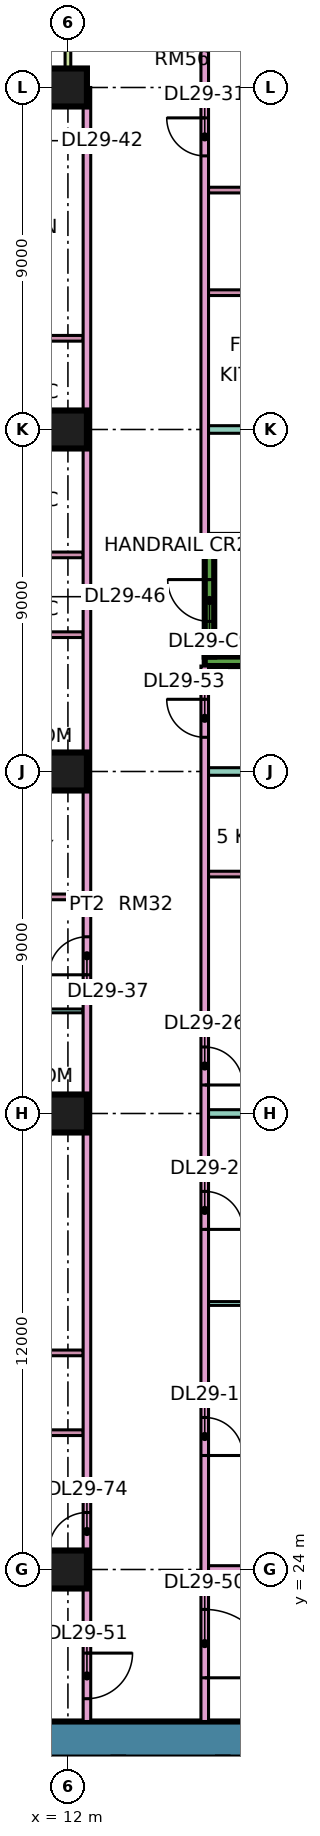
"""IFC4 building model, lengths in metres.
Left out: names, types, materials, properties, quantities, classifications, styles, units other than length and angle.
Written with IfcOpenShell. Run it as: python <this file> out.ifc"""

import sys

from ifc_helpers import new_model, si_unit, direction, frame, frame_2d, origin, origin_2d, place, context, subcontext, project, spatial, rectangle, extrude, element, fill, save


model = new_model("IFC4")
c1 = context("Model", 3, precision=1e-05, world=origin(), true_north=direction((0.0, 1.0)))
c2 = subcontext(c1, "Body", "Model", "MODEL_VIEW")
j1 = project(units=[si_unit("LENGTHUNIT", "METRE"), si_unit("PLANEANGLEUNIT", "RADIAN")], contexts=[c1])
p1 = place(None, origin())
s1 = spatial("IfcSite", under=j1, at=p1, CompositionType="ELEMENT")
p2 = place(p1, origin())
s2 = spatial("IfcBuilding", under=s1, at=p2, CompositionType="ELEMENT")
p3 = place(p2, frame((0.0, 0.0, 125.65)))
s3 = spatial("IfcBuildingStorey", under=s2, at=p3, CompositionType="ELEMENT", Elevation=125.65)
for number, where, z_axis, x_axis in (
    (1, (12.0, 24.0, 0.0), (0.0, 0.0, 1.0), (1.0, 0.0, 0.0)),
    (2, (12.0, 36.0, 0.0), (0.0, 0.0, 1.0), (1.0, 0.0, 0.0)),
    (3, (12.0, 45.0, 0.0), (0.0, 0.0, 1.0), (1.0, 0.0, 0.0)),
    (4, (12.0, 54.0, 0.0), (0.0, 0.0, 1.0), (1.0, 0.0, 0.0)),
    (5, (12.0, 63.0, 0.0), (0.0, 0.0, 1.0), (1.0, 0.0, 0.0)),
):
    element("IfcColumn", number, at=place(p3, frame(where, z_axis=z_axis, x_axis=x_axis)), inside=s3, PredefinedType="COLUMN", context=c2, shape_type="SweptSolid", body=[
        extrude(rectangle(XDim=1.0, YDim=1.0, at=origin_2d()), origin(), (0.0, 0.0, 1.0), 3.75),
    ])
p4 = place(p3, frame((9.0, 19.525, 0.0), z_axis=(0.0, 0.0, 1.0), x_axis=(1.0, 0.0, 0.0)))
e6 = element("IfcWall", 6, at=p4, inside=s3, PredefinedType="SHEAR", context=c2, shape_type="SweptSolid", body=[
    extrude(rectangle(XDim=25.0, YDim=0.95, at=frame_2d((12.5, 0.0))), origin(), (0.0, 0.0, 1.0), 3.75),
])
p5 = place(p4, frame((19.1, 0.0, 0.0)))
e7 = element("IfcOpeningElement", 7, at=p5, cuts=e6, PredefinedType="OPENING", context=c2, shape_type="SweptSolid", body=[
    extrude(rectangle(XDim=1.8, YDim=2.4, at=frame_2d((0.9, 1.2))), frame((0.0, 0.485, 0.0), z_axis=(0.0, -1.0, 0.0), x_axis=(1.0, 0.0, 0.0)), (0.0, 0.0, 1.0), 0.97),
])
for number, where, z_axis, x_axis in (
    (8, (15.6, 47.9, 0.0), (0.0, 0.0, 1.0), (1.0, 0.0, 0.0)),
    (9, (15.6, 51.1, 0.0), (0.0, 0.0, 1.0), (1.0, 0.0, 0.0)),
):
    element("IfcWall", number, at=place(p3, frame(where, z_axis=z_axis, x_axis=x_axis)), inside=s3, PredefinedType="SHEAR", context=c2, shape_type="SweptSolid", body=[
        extrude(rectangle(XDim=7.0, YDim=0.25, at=frame_2d((3.5, 0.0))), origin(), (0.0, 0.0, 1.0), 3.75),
    ])
p6 = place(p3, frame((15.725, 48.025, 0.0), z_axis=(0.0, 0.0, 1.0), x_axis=(0.0, 1.0, 0.0)))
e10 = element("IfcWall", 10, at=p6, inside=s3, PredefinedType="SHEAR", context=c2, shape_type="SweptSolid", body=[
    extrude(rectangle(XDim=2.95, YDim=0.25, at=frame_2d((1.475, 0.0))), origin(), (0.0, 0.0, 1.0), 3.75),
])
p7 = place(p6, frame((0.925, 0.0, 0.0)))
e11 = element("IfcOpeningElement", 11, at=p7, cuts=e10, PredefinedType="OPENING", context=c2, shape_type="SweptSolid", body=[
    extrude(rectangle(XDim=1.1, YDim=2.2, at=frame_2d((0.55, 1.1))), frame((0.0, 0.135, 0.0), z_axis=(0.0, -1.0, 0.0), x_axis=(1.0, 0.0, 0.0)), (0.0, 0.0, 1.0), 0.27),
])
p8 = place(p3, frame((11.925, 63.0, 0.0), z_axis=(0.0, 0.0, 1.0), x_axis=(-1.0, 0.0, 0.0)))
e12 = element("IfcWall", 12, at=p8, inside=s3, PredefinedType="SOLIDWALL", context=c2, shape_type="SweptSolid", body=[
    extrude(rectangle(XDim=10.35, YDim=0.15, at=frame_2d((5.175, 0.0))), origin(), (0.0, 0.0, 1.0), 3.35),
])
p9 = place(p8, frame((0.875, 0.0, 0.45)))
e13 = element("IfcOpeningElement", 13, at=p9, cuts=e12, PredefinedType="OPENING", context=c2, shape_type="SweptSolid", body=[
    extrude(rectangle(XDim=2.4, YDim=2.4, at=frame_2d((1.2, 1.2))), frame((0.0, 0.085, 0.0), z_axis=(0.0, -1.0, 0.0), x_axis=(1.0, 0.0, 0.0)), (0.0, 0.0, 1.0), 0.17),
])
p10 = place(p8, frame((6.688, 0.0, 0.0)))
e14 = element("IfcOpeningElement", 14, at=p10, cuts=e12, PredefinedType="OPENING", context=c2, shape_type="SweptSolid", body=[
    extrude(rectangle(XDim=1.8, YDim=2.4, at=frame_2d((0.9, 1.2))), frame((0.0, 0.085, 0.0), z_axis=(0.0, -1.0, 0.0), x_axis=(1.0, 0.0, 0.0)), (0.0, 0.0, 1.0), 0.17),
])
p11 = place(p3, frame((12.0, 64.5, 0.0), z_axis=(0.0, 0.0, 1.0), x_axis=(0.0, -1.0, 0.0)))
e15 = element("IfcWall", 15, at=p11, inside=s3, PredefinedType="SOLIDWALL", context=c2, shape_type="SweptSolid", body=[
    extrude(rectangle(XDim=1.5, YDim=0.15, at=frame_2d((0.75, 0.0))), origin(), (0.0, 0.0, 1.0), 3.35),
])
p12 = place(p3, frame((-1.35, 22.4, 0.0), z_axis=(0.0, 0.0, 1.0), x_axis=(1.0, 0.0, 0.0)))
e16 = element("IfcWall", 16, at=p12, inside=s3, PredefinedType="PARTITIONING", context=c2, shape_type="SweptSolid", body=[
    extrude(rectangle(XDim=13.75, YDim=0.2, at=frame_2d((6.875, 0.0))), origin(), (0.0, 0.0, 1.0), 3.35),
])
p13 = place(p3, frame((0.0, 36.0, 0.0), z_axis=(0.0, 0.0, 1.0), x_axis=(1.0, 0.0, 0.0)))
e17 = element("IfcWall", 17, at=p13, inside=s3, PredefinedType="PARTITIONING", context=c2, shape_type="SweptSolid", body=[
    extrude(rectangle(XDim=12.4, YDim=0.2, at=frame_2d((6.2, 0.0))), origin(), (0.0, 0.0, 1.0), 3.35),
])
for number, where, z_axis, x_axis in (
    (18, (7.175, 27.6, 0.0), (0.0, 0.0, 1.0), (1.0, 0.0, 0.0)),
    (19, (7.175, 29.7, 0.0), (0.0, 0.0, 1.0), (1.0, 0.0, 0.0)),
):
    element("IfcWall", number, at=place(p3, frame(where, z_axis=z_axis, x_axis=x_axis)), inside=s3, PredefinedType="PARTITIONING", context=c2, shape_type="SweptSolid", body=[
        extrude(rectangle(XDim=5.225, YDim=0.15, at=frame_2d((2.612, 0.0))), origin(), (0.0, 0.0, 1.0), 3.35),
    ])
p14 = place(p3, frame((8.25, 38.7, 0.0), z_axis=(0.0, 0.0, 1.0), x_axis=(1.0, 0.0, 0.0)))
e20 = element("IfcWall", 20, at=p14, inside=s3, PredefinedType="PARTITIONING", context=c2, shape_type="SweptSolid", body=[
    extrude(rectangle(XDim=4.15, YDim=0.1, at=frame_2d((2.075, 0.0))), origin(), (0.0, 0.0, 1.0), 3.35),
])
p15 = place(p14, frame((1.7, 0.0, 0.0)))
e21 = element("IfcOpeningElement", 21, at=p15, cuts=e20, PredefinedType="OPENING", context=c2, shape_type="SweptSolid", body=[
    extrude(rectangle(XDim=0.9, YDim=2.1, at=frame_2d((0.45, 1.05))), frame((0.0, 0.06, 0.0), z_axis=(0.0, -1.0, 0.0), x_axis=(1.0, 0.0, 0.0)), (0.0, 0.0, 1.0), 0.12),
])
for number, where, z_axis, x_axis in (
    (22, (8.375, 41.7, 0.0), (0.0, 0.0, 1.0), (1.0, 0.0, 0.0)),
    (23, (8.375, 45.0, 0.0), (0.0, 0.0, 1.0), (1.0, 0.0, 0.0)),
    (24, (8.375, 48.6, 0.0), (0.0, 0.0, 1.0), (1.0, 0.0, 0.0)),
    (25, (8.375, 50.7, 0.0), (0.0, 0.0, 1.0), (1.0, 0.0, 0.0)),
    (26, (8.375, 54.3, 0.0), (0.0, 0.0, 1.0), (1.0, 0.0, 0.0)),
    (27, (8.375, 56.4, 0.0), (0.0, 0.0, 1.0), (1.0, 0.0, 0.0)),
):
    element("IfcWall", number, at=place(p3, frame(where, z_axis=z_axis, x_axis=x_axis)), inside=s3, PredefinedType="PARTITIONING", context=c2, shape_type="SweptSolid", body=[
        extrude(rectangle(XDim=4.025, YDim=0.15, at=frame_2d((2.012, 0.0))), origin(), (0.0, 0.0, 1.0), 3.35),
    ])
p16 = place(p3, frame((12.5, 20.0, 0.0), z_axis=(0.0, 0.0, 1.0), x_axis=(0.0, 1.0, 0.0)))
e28 = element("IfcWall", 28, at=p16, inside=s3, PredefinedType="PARTITIONING", context=c2, shape_type="SweptSolid", body=[
    extrude(rectangle(XDim=43.0, YDim=0.2, at=frame_2d((21.5, 0.0))), origin(), (0.0, 0.0, 1.0), 3.35),
])
p17 = place(p16, frame((19.65, 0.0, 0.0)))
e29 = element("IfcOpeningElement", 29, at=p17, cuts=e28, PredefinedType="OPENING", context=c2, shape_type="SweptSolid", body=[
    extrude(rectangle(XDim=1.0, YDim=2.1, at=frame_2d((0.5, 1.05))), frame((0.0, 0.11, 0.0), z_axis=(0.0, -1.0, 0.0), x_axis=(1.0, 0.0, 0.0)), (0.0, 0.0, 1.0), 0.22),
])
p18 = place(p16, frame((0.6, 0.0, 0.0)))
e30 = element("IfcOpeningElement", 30, at=p18, cuts=e28, PredefinedType="OPENING", context=c2, shape_type="SweptSolid", body=[
    extrude(rectangle(XDim=1.2, YDim=2.1, at=frame_2d((0.6, 1.05))), frame((0.0, 0.11, 0.0), z_axis=(0.0, -1.0, 0.0), x_axis=(1.0, 0.0, 0.0)), (0.0, 0.0, 1.0), 0.22),
])
p19 = place(p16, frame((4.5, 0.0, 0.0)))
e31 = element("IfcOpeningElement", 31, at=p19, cuts=e28, PredefinedType="OPENING", context=c2, shape_type="SweptSolid", body=[
    extrude(rectangle(XDim=1.0, YDim=2.1, at=frame_2d((0.5, 1.05))), frame((0.0, 0.11, 0.0), z_axis=(0.0, -1.0, 0.0), x_axis=(1.0, 0.0, 0.0)), (0.0, 0.0, 1.0), 0.22),
])
p20 = place(p3, frame((15.6, 20.0, 0.0), z_axis=(0.0, 0.0, 1.0), x_axis=(0.0, 1.0, 0.0)))
e32 = element("IfcWall", 32, at=p20, inside=s3, PredefinedType="PARTITIONING", context=c2, shape_type="SweptSolid", body=[
    extrude(rectangle(XDim=27.775, YDim=0.2, at=frame_2d((13.887, 0.0))), origin(), (0.0, 0.0, 1.0), 3.35),
])
p21 = place(p20, frame((7.0, 0.0, 0.0)))
e33 = element("IfcOpeningElement", 33, at=p21, cuts=e32, PredefinedType="OPENING", context=c2, shape_type="SweptSolid", body=[
    extrude(rectangle(XDim=1.0, YDim=2.1, at=frame_2d((0.5, 1.05))), frame((0.0, 0.11, 0.0), z_axis=(0.0, -1.0, 0.0), x_axis=(1.0, 0.0, 0.0)), (0.0, 0.0, 1.0), 0.22),
])
p22 = place(p20, frame((12.95, 0.0, 0.0)))
e34 = element("IfcOpeningElement", 34, at=p22, cuts=e32, PredefinedType="OPENING", context=c2, shape_type="SweptSolid", body=[
    extrude(rectangle(XDim=1.0, YDim=2.1, at=frame_2d((0.5, 1.05))), frame((0.0, 0.11, 0.0), z_axis=(0.0, -1.0, 0.0), x_axis=(1.0, 0.0, 0.0)), (0.0, 0.0, 1.0), 0.22),
])
p23 = place(p20, frame((16.75, 0.0, 0.0)))
e35 = element("IfcOpeningElement", 35, at=p23, cuts=e32, PredefinedType="OPENING", context=c2, shape_type="SweptSolid", body=[
    extrude(rectangle(XDim=1.0, YDim=2.1, at=frame_2d((0.5, 1.05))), frame((0.0, 0.11, 0.0), z_axis=(0.0, -1.0, 0.0), x_axis=(1.0, 0.0, 0.0)), (0.0, 0.0, 1.0), 0.22),
])
p24 = place(p20, frame((1.15, 0.0, 0.0)))
e36 = element("IfcOpeningElement", 36, at=p24, cuts=e32, PredefinedType="OPENING", context=c2, shape_type="SweptSolid", body=[
    extrude(rectangle(XDim=1.8, YDim=2.1, at=frame_2d((0.9, 1.05))), frame((0.0, 0.11, 0.0), z_axis=(0.0, -1.0, 0.0), x_axis=(1.0, 0.0, 0.0)), (0.0, 0.0, 1.0), 0.22),
])
p25 = place(p20, frame((25.9, 0.0, 0.0)))
e37 = element("IfcOpeningElement", 37, at=p25, cuts=e32, PredefinedType="OPENING", context=c2, shape_type="SweptSolid", body=[
    extrude(rectangle(XDim=1.0, YDim=2.1, at=frame_2d((0.5, 1.05))), frame((0.0, 0.11, 0.0), z_axis=(0.0, -1.0, 0.0), x_axis=(1.0, 0.0, 0.0)), (0.0, 0.0, 1.0), 0.22),
])
p26 = place(p3, frame((15.6, 51.225, 0.0), z_axis=(0.0, 0.0, 1.0), x_axis=(0.0, 1.0, 0.0)))
e38 = element("IfcWall", 38, at=p26, inside=s3, PredefinedType="PARTITIONING", context=c2, shape_type="SweptSolid", body=[
    extrude(rectangle(XDim=13.125, YDim=0.2, at=frame_2d((6.562, 0.0))), origin(), (0.0, 0.0, 1.0), 3.35),
])
p27 = place(p26, frame((9.975, 0.0, 0.0)))
e39 = element("IfcOpeningElement", 39, at=p27, cuts=e38, PredefinedType="OPENING", context=c2, shape_type="SweptSolid", body=[
    extrude(rectangle(XDim=1.0, YDim=2.1, at=frame_2d((0.5, 1.05))), frame((0.0, 0.11, 0.0), z_axis=(0.0, -1.0, 0.0), x_axis=(1.0, 0.0, 0.0)), (0.0, 0.0, 1.0), 0.22),
])
p28 = place(p3, frame((15.7, 24.0, 0.0), z_axis=(0.0, 0.0, 1.0), x_axis=(1.0, 0.0, 0.0)))
e40 = element("IfcWall", 40, at=p28, inside=s3, PredefinedType="PARTITIONING", context=c2, shape_type="SweptSolid", body=[
    extrude(rectangle(XDim=5.8, YDim=0.2, at=frame_2d((2.9, 0.0))), origin(), (0.0, 0.0, 1.0), 3.35),
])
p29 = place(p3, frame((15.7, 31.0, 0.0), z_axis=(0.0, 0.0, 1.0), x_axis=(1.0, 0.0, 0.0)))
e41 = element("IfcWall", 41, at=p29, inside=s3, PredefinedType="PARTITIONING", context=c2, shape_type="SweptSolid", body=[
    extrude(rectangle(XDim=5.8, YDim=0.1, at=frame_2d((2.9, 0.0))), origin(), (0.0, 0.0, 1.0), 3.35),
])
p30 = place(p3, frame((15.7, 36.0, 0.0), z_axis=(0.0, 0.0, 1.0), x_axis=(1.0, 0.0, 0.0)))
e42 = element("IfcWall", 42, at=p30, inside=s3, PredefinedType="PARTITIONING", context=c2, shape_type="SweptSolid", body=[
    extrude(rectangle(XDim=8.3, YDim=0.2, at=frame_2d((4.15, 0.0))), origin(), (0.0, 0.0, 1.0), 3.35),
])
for number, where, z_axis, x_axis in (
    (43, (15.7, 38.4, 0.0), (0.0, 0.0, 1.0), (1.0, 0.0, 0.0)),
    (44, (15.7, 42.3, 0.0), (0.0, 0.0, 1.0), (1.0, 0.0, 0.0)),
):
    element("IfcWall", number, at=place(p3, frame(where, z_axis=z_axis, x_axis=x_axis)), inside=s3, PredefinedType="PARTITIONING", context=c2, shape_type="SweptSolid", body=[
        extrude(rectangle(XDim=3.125, YDim=0.15, at=frame_2d((1.562, 0.0))), origin(), (0.0, 0.0, 1.0), 3.35),
    ])
p31 = place(p3, frame((15.7, 45.0, 0.0), z_axis=(0.0, 0.0, 1.0), x_axis=(1.0, 0.0, 0.0)))
e45 = element("IfcWall", 45, at=p31, inside=s3, PredefinedType="PARTITIONING", context=c2, shape_type="SweptSolid", body=[
    extrude(rectangle(XDim=8.3, YDim=0.2, at=frame_2d((4.15, 0.0))), origin(), (0.0, 0.0, 1.0), 3.35),
])
p32 = place(p3, frame((15.7, 54.0, 0.0), z_axis=(0.0, 0.0, 1.0), x_axis=(1.0, 0.0, 0.0)))
e46 = element("IfcWall", 46, at=p32, inside=s3, PredefinedType="PARTITIONING", context=c2, shape_type="SweptSolid", body=[
    extrude(rectangle(XDim=8.226, YDim=0.2, at=frame_2d((4.113, 0.0))), origin(), (0.0, 0.0, 1.0), 3.35),
])
for number, where, z_axis, x_axis in (
    (47, (15.7, 57.6, 0.0), (0.0, 0.0, 1.0), (1.0, 0.0, 0.0)),
    (48, (15.7, 60.3, 0.0), (0.0, 0.0, 1.0), (1.0, 0.0, 0.0)),
):
    element("IfcWall", number, at=place(p3, frame(where, z_axis=z_axis, x_axis=x_axis)), inside=s3, PredefinedType="PARTITIONING", context=c2, shape_type="SweptSolid", body=[
        extrude(rectangle(XDim=2.825, YDim=0.15, at=frame_2d((1.413, 0.0))), origin(), (0.0, 0.0, 1.0), 3.35),
    ])
p33 = place(p7, frame((1.1, 0.0, 0.0), z_axis=(0.0, 0.0, 1.0), x_axis=(-1.0, 0.0, 0.0)))
e49 = element("IfcDoor", 49, at=p33, inside=s3, OperationType="SINGLE_SWING_RIGHT", PredefinedType="DOOR", context=c2, shape_type="SweptSolid", body=[
    extrude(rectangle(XDim=1.1, YDim=2.2, at=frame_2d((0.55, 1.1))), frame((0.0, 0.025, 0.0), z_axis=(0.0, -1.0, 0.0), x_axis=(1.0, 0.0, 0.0)), (0.0, 0.0, 1.0), 0.05),
])
fill(e11, e49)
p34 = place(p21, frame((1.0, 0.0, 0.0), z_axis=(0.0, 0.0, 1.0), x_axis=(-1.0, 0.0, 0.0)))
e50 = element("IfcDoor", 50, at=p34, inside=s3, OperationType="SINGLE_SWING_LEFT", PredefinedType="DOOR", context=c2, shape_type="SweptSolid", body=[
    extrude(rectangle(XDim=1.0, YDim=2.1, at=frame_2d((0.5, 1.05))), frame((0.0, 0.025, 0.0), z_axis=(0.0, -1.0, 0.0), x_axis=(1.0, 0.0, 0.0)), (0.0, 0.0, 1.0), 0.05),
])
fill(e33, e50)
p35 = place(p22, frame((1.0, 0.0, 0.0), z_axis=(0.0, 0.0, 1.0), x_axis=(-1.0, 0.0, 0.0)))
e51 = element("IfcDoor", 51, at=p35, inside=s3, OperationType="SINGLE_SWING_LEFT", PredefinedType="DOOR", context=c2, shape_type="SweptSolid", body=[
    extrude(rectangle(XDim=1.0, YDim=2.1, at=frame_2d((0.5, 1.05))), frame((0.0, 0.025, 0.0), z_axis=(0.0, -1.0, 0.0), x_axis=(1.0, 0.0, 0.0)), (0.0, 0.0, 1.0), 0.05),
])
fill(e34, e51)
p36 = place(p23, frame((1.0, 0.0, 0.0), z_axis=(0.0, 0.0, 1.0), x_axis=(-1.0, 0.0, 0.0)))
e52 = element("IfcDoor", 52, at=p36, inside=s3, OperationType="SINGLE_SWING_LEFT", PredefinedType="DOOR", context=c2, shape_type="SweptSolid", body=[
    extrude(rectangle(XDim=1.0, YDim=2.1, at=frame_2d((0.5, 1.05))), frame((0.0, 0.025, 0.0), z_axis=(0.0, -1.0, 0.0), x_axis=(1.0, 0.0, 0.0)), (0.0, 0.0, 1.0), 0.05),
])
fill(e35, e52)
p37 = place(p27, frame((1.0, 0.0, 0.0), z_axis=(0.0, 0.0, 1.0), x_axis=(-1.0, 0.0, 0.0)))
e53 = element("IfcDoor", 53, at=p37, inside=s3, OperationType="SINGLE_SWING_RIGHT", PredefinedType="DOOR", context=c2, shape_type="SweptSolid", body=[
    extrude(rectangle(XDim=1.0, YDim=2.1, at=frame_2d((0.5, 1.05))), frame((0.0, 0.025, 0.0), z_axis=(0.0, -1.0, 0.0), x_axis=(1.0, 0.0, 0.0)), (0.0, 0.0, 1.0), 0.05),
])
fill(e39, e53)
p38 = place(p17, origin())
e54 = element("IfcDoor", 54, at=p38, inside=s3, OperationType="SINGLE_SWING_LEFT", PredefinedType="DOOR", context=c2, shape_type="SweptSolid", body=[
    extrude(rectangle(XDim=1.0, YDim=2.1, at=frame_2d((0.5, 1.05))), frame((0.0, 0.025, 0.0), z_axis=(0.0, -1.0, 0.0), x_axis=(1.0, 0.0, 0.0)), (0.0, 0.0, 1.0), 0.05),
])
fill(e29, e54)
p39 = place(p24, frame((1.8, 0.0, 0.0), z_axis=(0.0, 0.0, 1.0), x_axis=(-1.0, 0.0, 0.0)))
e55 = element("IfcDoor", 55, at=p39, inside=s3, OperationType="DOUBLE_DOOR_SINGLE_SWING", PredefinedType="DOOR", context=c2, shape_type="SweptSolid", body=[
    extrude(rectangle(XDim=1.8, YDim=2.1, at=frame_2d((0.9, 1.05))), frame((0.0, 0.025, 0.0), z_axis=(0.0, -1.0, 0.0), x_axis=(1.0, 0.0, 0.0)), (0.0, 0.0, 1.0), 0.05),
])
fill(e36, e55)
p40 = place(p18, origin())
e56 = element("IfcDoor", 56, at=p40, inside=s3, OperationType="SINGLE_SWING_RIGHT", PredefinedType="DOOR", context=c2, shape_type="SweptSolid", body=[
    extrude(rectangle(XDim=1.2, YDim=2.1, at=frame_2d((0.6, 1.05))), frame((0.0, 0.025, 0.0), z_axis=(0.0, -1.0, 0.0), x_axis=(1.0, 0.0, 0.0)), (0.0, 0.0, 1.0), 0.05),
])
fill(e30, e56)
p41 = place(p25, frame((1.0, 0.0, 0.0), z_axis=(0.0, 0.0, 1.0), x_axis=(-1.0, 0.0, 0.0)))
e57 = element("IfcDoor", 57, at=p41, inside=s3, OperationType="SINGLE_SWING_RIGHT", PredefinedType="DOOR", context=c2, shape_type="SweptSolid", body=[
    extrude(rectangle(XDim=1.0, YDim=2.1, at=frame_2d((0.5, 1.05))), frame((0.0, 0.025, 0.0), z_axis=(0.0, -1.0, 0.0), x_axis=(1.0, 0.0, 0.0)), (0.0, 0.0, 1.0), 0.05),
])
fill(e37, e57)
p42 = place(p19, origin())
e58 = element("IfcDoor", 58, at=p42, inside=s3, OperationType="SINGLE_SWING_LEFT", PredefinedType="DOOR", context=c2, shape_type="SweptSolid", body=[
    extrude(rectangle(XDim=1.0, YDim=2.1, at=frame_2d((0.5, 1.05))), frame((0.0, 0.025, 0.0), z_axis=(0.0, -1.0, 0.0), x_axis=(1.0, 0.0, 0.0)), (0.0, 0.0, 1.0), 0.05),
])
fill(e31, e58)
save(model, sys.argv[1])
